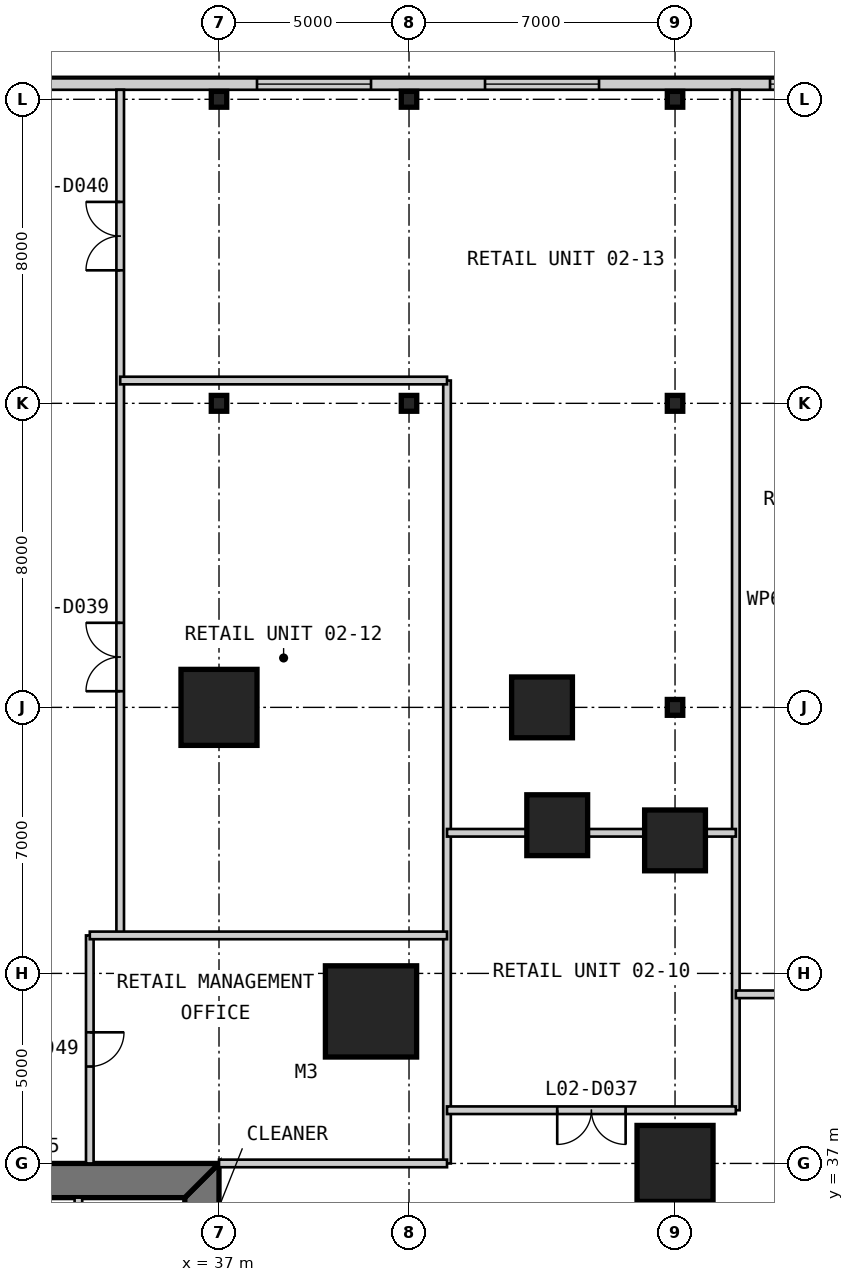
"""IFC4 building model, lengths in metres.
Left out: names, types, materials, properties, quantities, classifications, styles, units other than length and angle.
Written with IfcOpenShell. Run it as: python <this file> out.ifc"""

import sys

from ifc_helpers import new_model, si_unit, direction, frame, frame_2d, origin, origin_2d, place, context, subcontext, project, spatial, polyline, rectangle, i_section, outline, extrude, element, fill, save


model = new_model("IFC4")
c1 = context("Model", 3, precision=1e-05, world=origin(), true_north=direction((0.0, 1.0)))
c2 = subcontext(c1, "Body", "Model", "MODEL_VIEW")
j1 = project(units=[si_unit("LENGTHUNIT", "METRE"), si_unit("PLANEANGLEUNIT", "RADIAN")], contexts=[c1])
p1 = place(None, origin())
s1 = spatial("IfcSite", under=j1, at=p1, CompositionType="ELEMENT")
p2 = place(p1, origin())
s2 = spatial("IfcBuilding", under=s1, at=p2, CompositionType="ELEMENT")
p3 = place(p2, frame((0.0, 0.0, 11.8)))
s3 = spatial("IfcBuildingStorey", under=s2, at=p3, CompositionType="ELEMENT", Elevation=11.8)
p4 = place(p3, frame((41.0, 41.0, 0.0), z_axis=(0.0, 0.0, 1.0), x_axis=(1.0, 0.0, 0.0)))
e1 = element("IfcColumn", 1, at=p4, inside=s3, PredefinedType="COLUMN", context=c2, shape_type="SweptSolid", body=[
    extrude(rectangle(XDim=2.4, YDim=2.4, at=origin_2d()), origin(), (0.0, 0.0, 1.0), 4.8),
])
p5 = place(p3, frame((49.0, 37.0, 0.0), z_axis=(0.0, 0.0, 1.0), x_axis=(1.0, 0.0, 0.0)))
e2 = element("IfcColumn", 2, at=p5, inside=s3, PredefinedType="COLUMN", context=c2, shape_type="SweptSolid", body=[
    extrude(rectangle(XDim=2.0, YDim=2.0, at=origin_2d()), origin(), (0.0, 0.0, 1.0), 4.8),
])
for number, where, z_axis, x_axis in (
    (3, (49.0, 45.5, 0.0), (0.0, 0.0, 1.0), (1.0, 0.0, 0.0)),
    (4, (45.9, 45.9, 0.0), (0.0, 0.0, 1.0), (1.0, 0.0, 0.0)),
    (5, (45.5, 49.0, 0.0), (0.0, 0.0, 1.0), (1.0, 0.0, 0.0)),
):
    element("IfcColumn", number, at=place(p3, frame(where, z_axis=z_axis, x_axis=x_axis)), inside=s3, PredefinedType="COLUMN", context=c2, shape_type="SweptSolid", body=[
        extrude(rectangle(XDim=1.6, YDim=1.6, at=origin_2d()), origin(), (0.0, 0.0, 1.0), 4.8),
    ])
p6 = place(p3, frame((37.0, 49.0, 0.0), z_axis=(0.0, 0.0, 1.0), x_axis=(1.0, 0.0, 0.0)))
e6 = element("IfcColumn", 6, at=p6, inside=s3, PredefinedType="COLUMN", context=c2, shape_type="SweptSolid", body=[
    extrude(rectangle(XDim=2.0, YDim=2.0, at=origin_2d()), origin(), (0.0, 0.0, 1.0), 4.8),
])
for number, where, z_axis, x_axis in (
    (7, (37.0, 57.0, 0.0), (0.0, 0.0, 1.0), (1.0, 0.0, 0.0)),
    (8, (37.0, 65.0, 0.0), (0.0, 0.0, 1.0), (1.0, 0.0, 0.0)),
    (9, (42.0, 57.0, 0.0), (0.0, 0.0, 1.0), (1.0, 0.0, 0.0)),
    (10, (42.0, 65.0, 0.0), (0.0, 0.0, 1.0), (1.0, 0.0, 0.0)),
    (11, (49.0, 49.0, 0.0), (0.0, 0.0, 1.0), (1.0, 0.0, 0.0)),
    (12, (49.0, 57.0, 0.0), (0.0, 0.0, 1.0), (1.0, 0.0, 0.0)),
    (13, (49.0, 65.0, 0.0), (0.0, 0.0, 1.0), (1.0, 0.0, 0.0)),
):
    element("IfcColumn", number, at=place(p3, frame(where, z_axis=z_axis, x_axis=x_axis)), inside=s3, PredefinedType="COLUMN", context=c2, shape_type="SweptSolid", body=[
        extrude(i_section(OverallWidth=0.406, OverallDepth=0.417, WebThickness=0.03, FlangeThickness=0.048, at=origin_2d()), origin(), (0.0, 0.0, 1.0), 4.8),
    ])
p7 = place(p3, frame((36.55, 13.9, 0.0), z_axis=(0.0, 0.0, 1.0), x_axis=(0.0, 1.0, 0.0)))
e14 = element("IfcWall", 14, at=p7, inside=s3, PredefinedType="SHEAR", context=c2, shape_type="SweptSolid", body=[
    extrude(outline(polyline([(-0.9, -0.45), (23.1, -0.45), (22.2, 0.45), (0.0, 0.45), (-0.9, -0.45)])), origin(), (0.0, 0.0, 1.0), 4.8),
])
p8 = place(p7, frame((20.2, 0.0, 0.0)))
e15 = element("IfcOpeningElement", 15, at=p8, cuts=e14, PredefinedType="OPENING", context=c2, shape_type="SweptSolid", body=[
    extrude(rectangle(XDim=1.0, YDim=2.2, at=frame_2d((0.5, 1.1))), frame((0.0, 0.46, 0.0), z_axis=(0.0, -1.0, 0.0), x_axis=(1.0, 0.0, 0.0)), (0.0, 0.0, 1.0), 0.92),
])
p9 = place(p7, frame((17.25, 0.0, 0.0)))
e16 = element("IfcOpeningElement", 16, at=p9, cuts=e14, PredefinedType="OPENING", context=c2, shape_type="SweptSolid", body=[
    extrude(rectangle(XDim=0.9, YDim=2.2, at=frame_2d((0.45, 1.1))), frame((0.0, 0.46, 0.0), z_axis=(0.0, -1.0, 0.0), x_axis=(1.0, 0.0, 0.0)), (0.0, 0.0, 1.0), 0.92),
])
p10 = place(p3, frame((37.0, 36.55, 0.0), z_axis=(0.0, 0.0, 1.0), x_axis=(-1.0, 0.0, 0.0)))
e17 = element("IfcWall", 17, at=p10, inside=s3, PredefinedType="SHEAR", context=c2, shape_type="SweptSolid", body=[
    extrude(outline(polyline([(0.0, -0.45), (24.0, -0.45), (23.1, 0.45), (0.9, 0.45), (0.0, -0.45)])), origin(), (0.0, 0.0, 1.0), 4.8),
])
p11 = place(p10, frame((4.9, 0.0, 0.0)))
e18 = element("IfcOpeningElement", 18, at=p11, cuts=e17, PredefinedType="OPENING", context=c2, shape_type="SweptSolid", body=[
    extrude(rectangle(XDim=1.0, YDim=2.2, at=frame_2d((0.5, 1.1))), frame((0.0, 0.46, 0.0), z_axis=(0.0, -1.0, 0.0), x_axis=(1.0, 0.0, 0.0)), (0.0, 0.0, 1.0), 0.92),
])
p12 = place(p10, frame((8.9, 0.0, 0.0)))
e19 = element("IfcOpeningElement", 19, at=p12, cuts=e17, PredefinedType="OPENING", context=c2, shape_type="SweptSolid", body=[
    extrude(rectangle(XDim=1.1, YDim=2.2, at=frame_2d((0.55, 1.1))), frame((0.0, 0.46, 0.0), z_axis=(0.0, -1.0, 0.0), x_axis=(1.0, 0.0, 0.0)), (0.0, 0.0, 1.0), 0.92),
])
p13 = place(p10, frame((15.05, 0.0, 0.0)))
e20 = element("IfcOpeningElement", 20, at=p13, cuts=e17, PredefinedType="OPENING", context=c2, shape_type="SweptSolid", body=[
    extrude(rectangle(XDim=0.9, YDim=2.2, at=frame_2d((0.45, 1.1))), frame((0.0, 0.46, 0.0), z_axis=(0.0, -1.0, 0.0), x_axis=(1.0, 0.0, 0.0)), (0.0, 0.0, 1.0), 0.92),
])
p14 = place(p10, frame((17.9, 0.0, 0.0)))
e21 = element("IfcOpeningElement", 21, at=p14, cuts=e17, PredefinedType="OPENING", context=c2, shape_type="SweptSolid", body=[
    extrude(rectangle(XDim=1.0, YDim=2.2, at=frame_2d((0.5, 1.1))), frame((0.0, 0.46, 0.0), z_axis=(0.0, -1.0, 0.0), x_axis=(1.0, 0.0, 0.0)), (0.0, 0.0, 1.0), 0.92),
])
p15 = place(p10, frame((21.4, 0.0, 0.0)))
e22 = element("IfcOpeningElement", 22, at=p15, cuts=e17, PredefinedType="OPENING", context=c2, shape_type="SweptSolid", body=[
    extrude(rectangle(XDim=1.0, YDim=2.2, at=frame_2d((0.5, 1.1))), frame((0.0, 0.46, 0.0), z_axis=(0.0, -1.0, 0.0), x_axis=(1.0, 0.0, 0.0)), (0.0, 0.0, 1.0), 0.92),
])
p16 = place(p3, frame((57.55, 65.4, 0.0), z_axis=(0.0, 0.0, 1.0), x_axis=(-1.0, 0.0, 0.0)))
e23 = element("IfcWall", 23, at=p16, inside=s3, PredefinedType="SOLIDWALL", context=c2, shape_type="SweptSolid", body=[
    extrude(rectangle(XDim=73.1, YDim=0.3, at=frame_2d((36.55, 0.0))), origin(), (0.0, 0.0, 1.0), 4.5),
])
p17 = place(p16, frame((67.05, 0.0, 0.9)))
e24 = element("IfcOpeningElement", 24, at=p17, cuts=e23, PredefinedType="OPENING", context=c2, shape_type="SweptSolid", body=[
    extrude(rectangle(XDim=3.0, YDim=2.4, at=frame_2d((1.5, 1.2))), frame((0.0, 0.16, 0.0), z_axis=(0.0, -1.0, 0.0), x_axis=(1.0, 0.0, 0.0)), (0.0, 0.0, 1.0), 0.32),
])
p18 = place(p16, frame((59.05, 0.0, 0.9)))
e25 = element("IfcOpeningElement", 25, at=p18, cuts=e23, PredefinedType="OPENING", context=c2, shape_type="SweptSolid", body=[
    extrude(rectangle(XDim=3.0, YDim=2.4, at=frame_2d((1.5, 1.2))), frame((0.0, 0.16, 0.0), z_axis=(0.0, -1.0, 0.0), x_axis=(1.0, 0.0, 0.0)), (0.0, 0.0, 1.0), 0.32),
])
p19 = place(p16, frame((51.05, 0.0, 0.9)))
e26 = element("IfcOpeningElement", 26, at=p19, cuts=e23, PredefinedType="OPENING", context=c2, shape_type="SweptSolid", body=[
    extrude(rectangle(XDim=3.0, YDim=2.4, at=frame_2d((1.5, 1.2))), frame((0.0, 0.16, 0.0), z_axis=(0.0, -1.0, 0.0), x_axis=(1.0, 0.0, 0.0)), (0.0, 0.0, 1.0), 0.32),
])
p20 = place(p16, frame((37.05, 0.0, 0.9)))
e27 = element("IfcOpeningElement", 27, at=p20, cuts=e23, PredefinedType="OPENING", context=c2, shape_type="SweptSolid", body=[
    extrude(rectangle(XDim=3.0, YDim=2.4, at=frame_2d((1.5, 1.2))), frame((0.0, 0.16, 0.0), z_axis=(0.0, -1.0, 0.0), x_axis=(1.0, 0.0, 0.0)), (0.0, 0.0, 1.0), 0.32),
])
p21 = place(p16, frame((25.05, 0.0, 0.9)))
e28 = element("IfcOpeningElement", 28, at=p21, cuts=e23, PredefinedType="OPENING", context=c2, shape_type="SweptSolid", body=[
    extrude(rectangle(XDim=3.0, YDim=2.4, at=frame_2d((1.5, 1.2))), frame((0.0, 0.16, 0.0), z_axis=(0.0, -1.0, 0.0), x_axis=(1.0, 0.0, 0.0)), (0.0, 0.0, 1.0), 0.32),
])
p22 = place(p16, frame((16.55, 0.0, 0.9)))
e29 = element("IfcOpeningElement", 29, at=p22, cuts=e23, PredefinedType="OPENING", context=c2, shape_type="SweptSolid", body=[
    extrude(rectangle(XDim=3.0, YDim=2.4, at=frame_2d((1.5, 1.2))), frame((0.0, 0.16, 0.0), z_axis=(0.0, -1.0, 0.0), x_axis=(1.0, 0.0, 0.0)), (0.0, 0.0, 1.0), 0.32),
])
p23 = place(p16, frame((10.55, 0.0, 0.9)))
e30 = element("IfcOpeningElement", 30, at=p23, cuts=e23, PredefinedType="OPENING", context=c2, shape_type="SweptSolid", body=[
    extrude(rectangle(XDim=3.0, YDim=2.4, at=frame_2d((1.5, 1.2))), frame((0.0, 0.16, 0.0), z_axis=(0.0, -1.0, 0.0), x_axis=(1.0, 0.0, 0.0)), (0.0, 0.0, 1.0), 0.32),
])
p24 = place(p16, frame((3.05, 0.0, 0.9)))
e31 = element("IfcOpeningElement", 31, at=p24, cuts=e23, PredefinedType="OPENING", context=c2, shape_type="SweptSolid", body=[
    extrude(rectangle(XDim=3.0, YDim=2.4, at=frame_2d((1.5, 1.2))), frame((0.0, 0.16, 0.0), z_axis=(0.0, -1.0, 0.0), x_axis=(1.0, 0.0, 0.0)), (0.0, 0.0, 1.0), 0.32),
])
p25 = place(p3, frame((33.3, 36.1, 0.0), z_axis=(0.0, 0.0, 1.0), x_axis=(0.0, -1.0, 0.0)))
e32 = element("IfcWall", 32, at=p25, inside=s3, PredefinedType="PARTITIONING", context=c2, shape_type="SweptSolid", body=[
    extrude(rectangle(XDim=16.1, YDim=0.2, at=frame_2d((8.05, 0.0))), origin(), (0.0, 0.0, 1.0), 4.6),
])
p26 = place(p25, frame((3.8, 0.0, 0.0)))
e33 = element("IfcOpeningElement", 33, at=p26, cuts=e32, PredefinedType="OPENING", context=c2, shape_type="SweptSolid", body=[
    extrude(rectangle(XDim=0.9, YDim=2.2, at=frame_2d((0.45, 1.1))), frame((0.0, 0.11, 0.0), z_axis=(0.0, -1.0, 0.0), x_axis=(1.0, 0.0, 0.0)), (0.0, 0.0, 1.0), 0.22),
])
p27 = place(p3, frame((33.6, 37.0, 0.0), z_axis=(0.0, 0.0, 1.0), x_axis=(0.0, 1.0, 0.0)))
e34 = element("IfcWall", 34, at=p27, inside=s3, PredefinedType="PARTITIONING", context=c2, shape_type="SweptSolid", body=[
    extrude(rectangle(XDim=6.0, YDim=0.2, at=frame_2d((3.0, 0.0))), origin(), (0.0, 0.0, 1.0), 4.5),
])
p28 = place(p27, frame((2.55, 0.0, 0.0)))
e35 = element("IfcOpeningElement", 35, at=p28, cuts=e34, PredefinedType="OPENING", context=c2, shape_type="SweptSolid", body=[
    extrude(rectangle(XDim=0.9, YDim=2.2, at=frame_2d((0.45, 1.1))), frame((0.0, 0.11, 0.0), z_axis=(0.0, -1.0, 0.0), x_axis=(1.0, 0.0, 0.0)), (0.0, 0.0, 1.0), 0.22),
])
p29 = place(p3, frame((34.4, 43.0, 0.0), z_axis=(0.0, 0.0, 1.0), x_axis=(0.0, 1.0, 0.0)))
e36 = element("IfcWall", 36, at=p29, inside=s3, PredefinedType="PARTITIONING", context=c2, shape_type="SweptSolid", body=[
    extrude(rectangle(XDim=22.25, YDim=0.2, at=frame_2d((11.125, 0.0))), origin(), (0.0, 0.0, 1.0), 4.5),
])
p30 = place(p29, frame((6.425, 0.0, 0.0)))
e37 = element("IfcOpeningElement", 37, at=p30, cuts=e36, PredefinedType="OPENING", context=c2, shape_type="SweptSolid", body=[
    extrude(rectangle(XDim=1.8, YDim=2.4, at=frame_2d((0.9, 1.2))), frame((0.0, 0.11, 0.0), z_axis=(0.0, -1.0, 0.0), x_axis=(1.0, 0.0, 0.0)), (0.0, 0.0, 1.0), 0.22),
])
p31 = place(p29, frame((17.5, 0.0, 0.0)))
e38 = element("IfcOpeningElement", 38, at=p31, cuts=e36, PredefinedType="OPENING", context=c2, shape_type="SweptSolid", body=[
    extrude(rectangle(XDim=1.8, YDim=2.4, at=frame_2d((0.9, 1.2))), frame((0.0, 0.11, 0.0), z_axis=(0.0, -1.0, 0.0), x_axis=(1.0, 0.0, 0.0)), (0.0, 0.0, 1.0), 0.22),
])
p32 = place(p3, frame((43.0, 37.0, 0.0), z_axis=(0.0, 0.0, 1.0), x_axis=(0.0, 1.0, 0.0)))
e39 = element("IfcWall", 39, at=p32, inside=s3, PredefinedType="PARTITIONING", context=c2, shape_type="SweptSolid", body=[
    extrude(rectangle(XDim=20.6, YDim=0.2, at=frame_2d((10.3, 0.0))), origin(), (0.0, 0.0, 1.0), 4.5),
])
p33 = place(p3, frame((50.6, 38.4, 0.0), z_axis=(0.0, 0.0, 1.0), x_axis=(0.0, 1.0, 0.0)))
e40 = element("IfcWall", 40, at=p33, inside=s3, PredefinedType="PARTITIONING", context=c2, shape_type="SweptSolid", body=[
    extrude(rectangle(XDim=26.85, YDim=0.2, at=frame_2d((13.425, 0.0))), origin(), (0.0, 0.0, 1.0), 4.5),
])
p34 = place(p3, frame((37.0, 37.0, 0.0), z_axis=(0.0, 0.0, 1.0), x_axis=(1.0, 0.0, 0.0)))
e41 = element("IfcWall", 41, at=p34, inside=s3, PredefinedType="PARTITIONING", context=c2, shape_type="SweptSolid", body=[
    extrude(rectangle(XDim=6.0, YDim=0.2, at=frame_2d((3.0, 0.0))), origin(), (0.0, 0.0, 1.0), 3.653),
])
p35 = place(p3, frame((43.0, 38.4, 0.0), z_axis=(0.0, 0.0, 1.0), x_axis=(1.0, 0.0, 0.0)))
e42 = element("IfcWall", 42, at=p35, inside=s3, PredefinedType="PARTITIONING", context=c2, shape_type="SweptSolid", body=[
    extrude(rectangle(XDim=7.6, YDim=0.2, at=frame_2d((3.8, 0.0))), origin(), (0.0, 0.0, 1.0), 4.5),
])
p36 = place(p35, frame((2.9, 0.0, 0.0)))
e43 = element("IfcOpeningElement", 43, at=p36, cuts=e42, PredefinedType="OPENING", context=c2, shape_type="SweptSolid", body=[
    extrude(rectangle(XDim=1.8, YDim=2.4, at=frame_2d((0.9, 1.2))), frame((0.0, 0.11, 0.0), z_axis=(0.0, -1.0, 0.0), x_axis=(1.0, 0.0, 0.0)), (0.0, 0.0, 1.0), 0.22),
])
p37 = place(p3, frame((50.6, 41.45, 0.0), z_axis=(0.0, 0.0, 1.0), x_axis=(1.0, 0.0, 0.0)))
e44 = element("IfcWall", 44, at=p37, inside=s3, PredefinedType="PARTITIONING", context=c2, shape_type="SweptSolid", body=[
    extrude(rectangle(XDim=6.65, YDim=0.2, at=frame_2d((3.325, 0.0))), origin(), (0.0, 0.0, 1.0), 4.5),
])
p38 = place(p37, frame((2.425, 0.0, 0.0)))
e45 = element("IfcOpeningElement", 45, at=p38, cuts=e44, PredefinedType="OPENING", context=c2, shape_type="SweptSolid", body=[
    extrude(rectangle(XDim=1.8, YDim=2.4, at=frame_2d((0.9, 1.2))), frame((0.0, 0.11, 0.0), z_axis=(0.0, -1.0, 0.0), x_axis=(1.0, 0.0, 0.0)), (0.0, 0.0, 1.0), 0.22),
])
p39 = place(p3, frame((33.6, 43.0, 0.0), z_axis=(0.0, 0.0, 1.0), x_axis=(1.0, 0.0, 0.0)))
e46 = element("IfcWall", 46, at=p39, inside=s3, PredefinedType="PARTITIONING", context=c2, shape_type="SweptSolid", body=[
    extrude(rectangle(XDim=9.4, YDim=0.2, at=frame_2d((4.7, 0.0))), origin(), (0.0, 0.0, 1.0), 4.5),
])
p40 = place(p3, frame((43.0, 45.7, 0.0), z_axis=(0.0, 0.0, 1.0), x_axis=(1.0, 0.0, 0.0)))
e47 = element("IfcWall", 47, at=p40, inside=s3, PredefinedType="PARTITIONING", context=c2, shape_type="SweptSolid", body=[
    extrude(rectangle(XDim=2.1, YDim=0.2, at=frame_2d((1.05, 0.0))), origin(), (0.0, 0.0, 1.0), 4.5),
])
p41 = place(p3, frame((46.7, 45.7, 0.0), z_axis=(0.0, 0.0, 1.0), x_axis=(1.0, 0.0, 0.0)))
e48 = element("IfcWall", 48, at=p41, inside=s3, PredefinedType="PARTITIONING", context=c2, shape_type="SweptSolid", body=[
    extrude(rectangle(XDim=1.5, YDim=0.2, at=frame_2d((0.75, 0.0))), origin(), (0.0, 0.0, 1.0), 3.65),
])
p42 = place(p3, frame((49.8, 45.7, 0.0), z_axis=(0.0, 0.0, 1.0), x_axis=(1.0, 0.0, 0.0)))
e49 = element("IfcWall", 49, at=p42, inside=s3, PredefinedType="PARTITIONING", context=c2, shape_type="SweptSolid", body=[
    extrude(rectangle(XDim=0.8, YDim=0.2, at=frame_2d((0.4, 0.0))), origin(), (0.0, 0.0, 1.0), 4.5),
])
p43 = place(p3, frame((34.4, 57.6, 0.0), z_axis=(0.0, 0.0, 1.0), x_axis=(1.0, 0.0, 0.0)))
e50 = element("IfcWall", 50, at=p43, inside=s3, PredefinedType="PARTITIONING", context=c2, shape_type="SweptSolid", body=[
    extrude(rectangle(XDim=8.6, YDim=0.2, at=frame_2d((4.3, 0.0))), origin(), (0.0, 0.0, 1.0), 4.5),
])
p44 = place(p22, origin())
e51 = element("IfcWindow", 51, at=p44, inside=s3, PartitioningType="SINGLE_PANEL", PredefinedType="WINDOW", context=c2, shape_type="SweptSolid", body=[
    extrude(rectangle(XDim=3.0, YDim=2.4, at=frame_2d((1.5, 1.2))), frame((0.0, 0.03, 0.0), z_axis=(0.0, -1.0, 0.0), x_axis=(1.0, 0.0, 0.0)), (0.0, 0.0, 1.0), 0.06),
])
fill(e29, e51)
p45 = place(p23, origin())
e52 = element("IfcWindow", 52, at=p45, inside=s3, PartitioningType="SINGLE_PANEL", PredefinedType="WINDOW", context=c2, shape_type="SweptSolid", body=[
    extrude(rectangle(XDim=3.0, YDim=2.4, at=frame_2d((1.5, 1.2))), frame((0.0, 0.03, 0.0), z_axis=(0.0, -1.0, 0.0), x_axis=(1.0, 0.0, 0.0)), (0.0, 0.0, 1.0), 0.06),
])
fill(e30, e52)
p46 = place(p24, origin())
e53 = element("IfcWindow", 53, at=p46, inside=s3, PartitioningType="SINGLE_PANEL", PredefinedType="WINDOW", context=c2, shape_type="SweptSolid", body=[
    extrude(rectangle(XDim=3.0, YDim=2.4, at=frame_2d((1.5, 1.2))), frame((0.0, 0.03, 0.0), z_axis=(0.0, -1.0, 0.0), x_axis=(1.0, 0.0, 0.0)), (0.0, 0.0, 1.0), 0.06),
])
fill(e31, e53)
p47 = place(p36, frame((1.8, 0.0, 0.0), z_axis=(0.0, 0.0, 1.0), x_axis=(-1.0, 0.0, 0.0)))
e54 = element("IfcDoor", 54, at=p47, inside=s3, OperationType="DOUBLE_DOOR_SINGLE_SWING", PredefinedType="DOOR", context=c2, shape_type="SweptSolid", body=[
    extrude(rectangle(XDim=1.8, YDim=2.4, at=frame_2d((0.9, 1.2))), frame((0.0, 0.025, 0.0), z_axis=(0.0, -1.0, 0.0), x_axis=(1.0, 0.0, 0.0)), (0.0, 0.0, 1.0), 0.05),
])
fill(e43, e54)
p48 = place(p30, origin())
e55 = element("IfcDoor", 55, at=p48, inside=s3, OperationType="DOUBLE_DOOR_SINGLE_SWING", PredefinedType="DOOR", context=c2, shape_type="SweptSolid", body=[
    extrude(rectangle(XDim=1.8, YDim=2.4, at=frame_2d((0.9, 1.2))), frame((0.0, 0.025, 0.0), z_axis=(0.0, -1.0, 0.0), x_axis=(1.0, 0.0, 0.0)), (0.0, 0.0, 1.0), 0.05),
])
fill(e37, e55)
p49 = place(p31, origin())
e56 = element("IfcDoor", 56, at=p49, inside=s3, OperationType="DOUBLE_DOOR_SINGLE_SWING", PredefinedType="DOOR", context=c2, shape_type="SweptSolid", body=[
    extrude(rectangle(XDim=1.8, YDim=2.4, at=frame_2d((0.9, 1.2))), frame((0.0, 0.025, 0.0), z_axis=(0.0, -1.0, 0.0), x_axis=(1.0, 0.0, 0.0)), (0.0, 0.0, 1.0), 0.05),
])
fill(e38, e56)
p50 = place(p28, frame((0.9, 0.0, 0.0), z_axis=(0.0, 0.0, 1.0), x_axis=(-1.0, 0.0, 0.0)))
e57 = element("IfcDoor", 57, at=p50, inside=s3, OperationType="SINGLE_SWING_LEFT", PredefinedType="DOOR", context=c2, shape_type="SweptSolid", body=[
    extrude(rectangle(XDim=0.9, YDim=2.2, at=frame_2d((0.45, 1.1))), frame((0.0, 0.025, 0.0), z_axis=(0.0, -1.0, 0.0), x_axis=(1.0, 0.0, 0.0)), (0.0, 0.0, 1.0), 0.05),
])
fill(e35, e57)
save(model, sys.argv[1])
